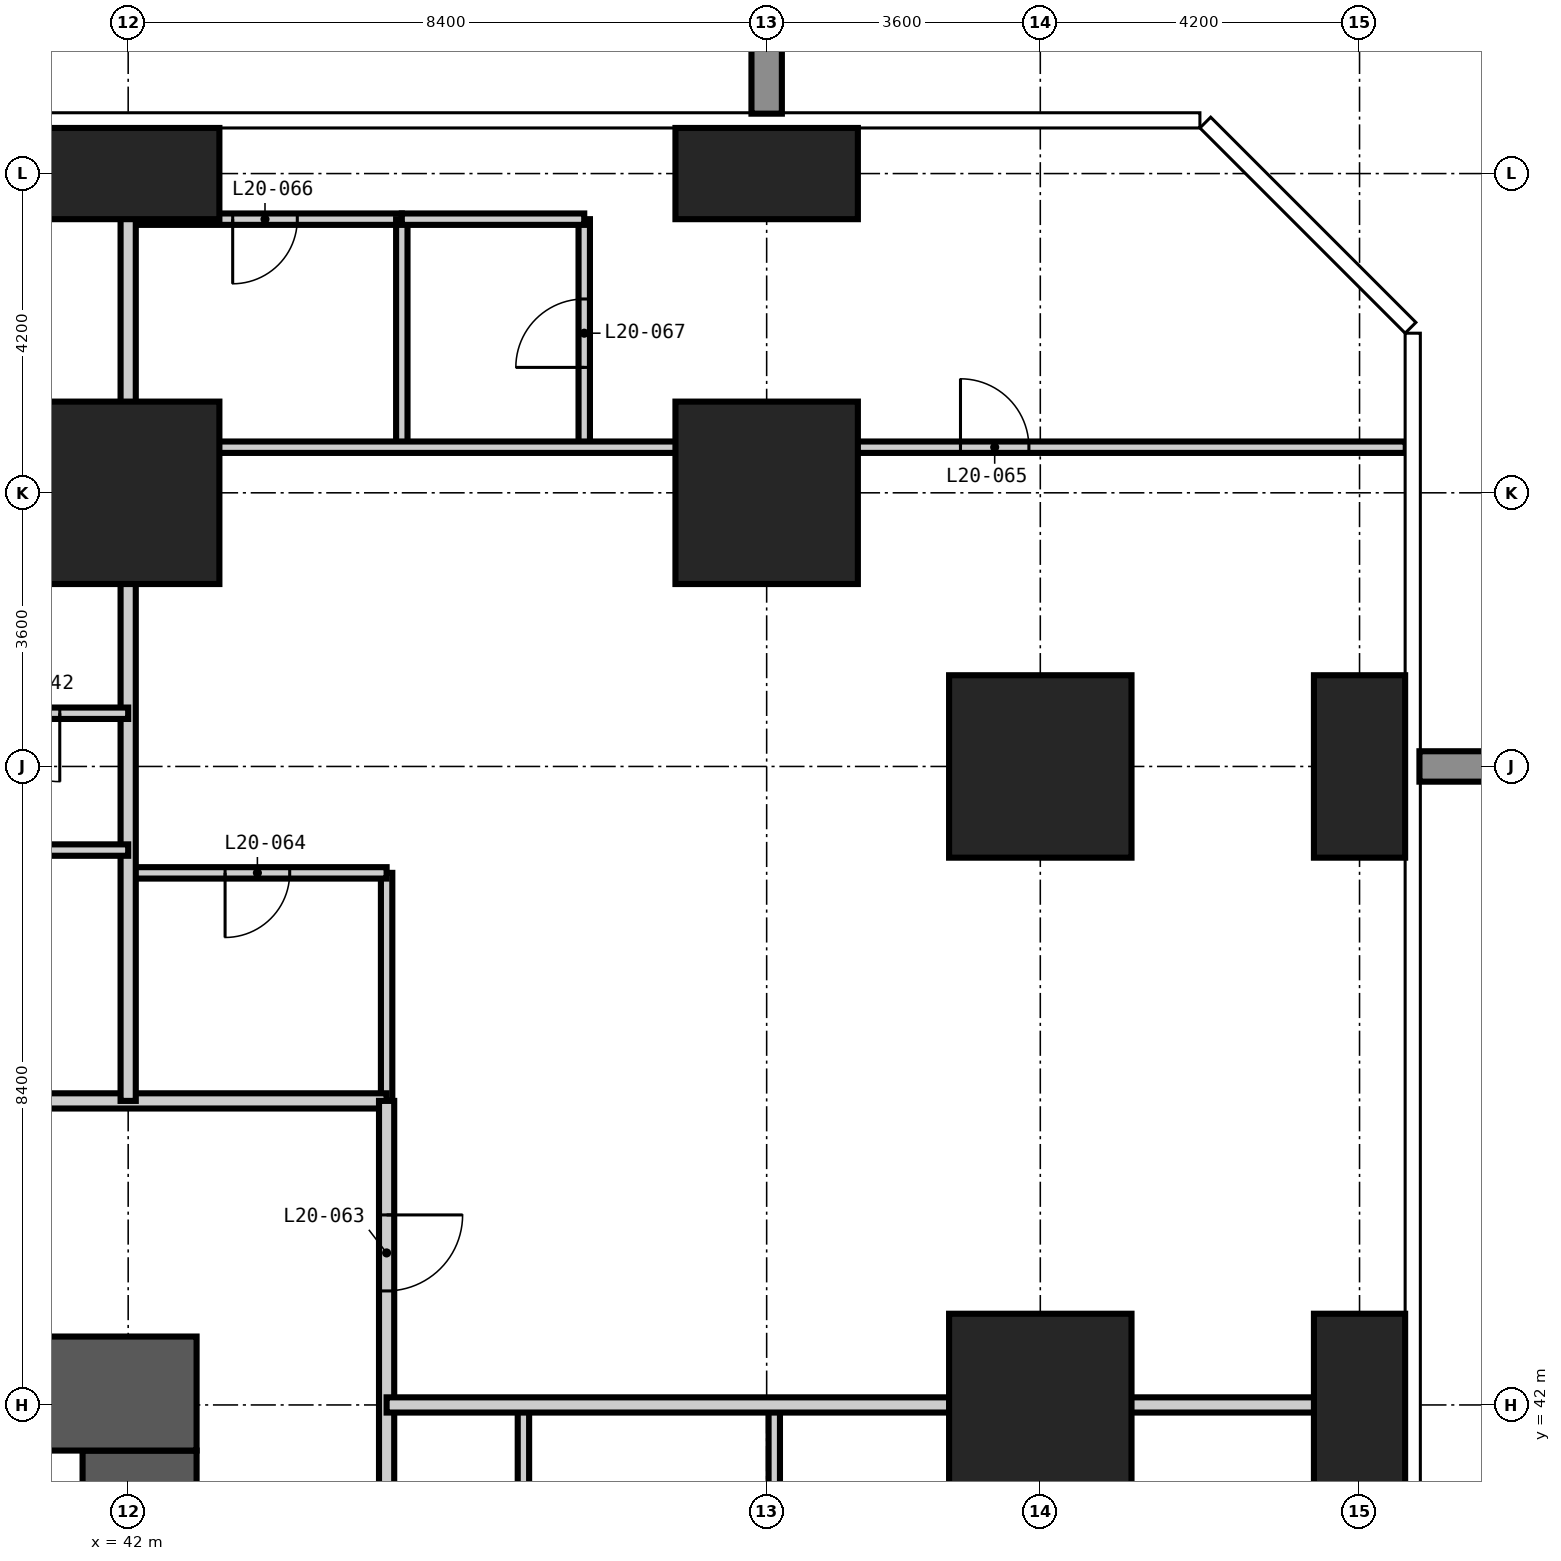
"""IFC4 building model, lengths in metres.
Left out: names, types, materials, properties, quantities, classifications, styles, units other than length and angle.
Written with IfcOpenShell. Run it as: python <this file> out.ifc"""

import sys

from ifc_helpers import new_model, si_unit, direction, frame, frame_2d, origin, origin_2d, place, context, subcontext, project, spatial, rectangle, extrude, element, fill, save


model = new_model("IFC4")
c1 = context("Model", 3, precision=1e-05, world=origin(), true_north=direction((0.0, 1.0)))
c2 = subcontext(c1, "Body", "Model", "MODEL_VIEW")
j1 = project(units=[si_unit("LENGTHUNIT", "METRE"), si_unit("PLANEANGLEUNIT", "RADIAN")], contexts=[c1])
p1 = place(None, origin())
s1 = spatial("IfcSite", under=j1, at=p1, CompositionType="ELEMENT")
p2 = place(p1, origin())
s2 = spatial("IfcBuilding", under=s1, at=p2, CompositionType="ELEMENT")
p3 = place(p2, frame((0.0, 0.0, 81.0)))
s3 = spatial("IfcBuildingStorey", under=s2, at=p3, CompositionType="ELEMENT", Elevation=81.0)
p4 = place(p3, frame((42.0, 54.0, -0.35), z_axis=(0.0, 0.0, 1.0), x_axis=(1.0, 0.0, 0.0)))
e1 = element("IfcColumn", 1, at=p4, inside=s3, PredefinedType="COLUMN", context=c2, shape_type="SweptSolid", body=[
    extrude(rectangle(XDim=2.4, YDim=2.4, at=origin_2d()), origin(), (0.0, 0.0, 1.0), 3.6),
])
p5 = place(p3, frame((42.0, 58.2, -0.35), z_axis=(0.0, 0.0, 1.0), x_axis=(1.0, 0.0, 0.0)))
e2 = element("IfcColumn", 2, at=p5, inside=s3, PredefinedType="COLUMN", context=c2, shape_type="SweptSolid", body=[
    extrude(rectangle(XDim=2.4, YDim=1.2, at=origin_2d()), origin(), (0.0, 0.0, 1.0), 3.6),
])
p6 = place(p3, frame((50.4, 54.0, -0.35), z_axis=(0.0, 0.0, 1.0), x_axis=(1.0, 0.0, 0.0)))
e3 = element("IfcColumn", 3, at=p6, inside=s3, PredefinedType="COLUMN", context=c2, shape_type="SweptSolid", body=[
    extrude(rectangle(XDim=2.4, YDim=2.4, at=origin_2d()), origin(), (0.0, 0.0, 1.0), 3.6),
])
p7 = place(p3, frame((50.4, 58.2, -0.35), z_axis=(0.0, 0.0, 1.0), x_axis=(1.0, 0.0, 0.0)))
e4 = element("IfcColumn", 4, at=p7, inside=s3, PredefinedType="COLUMN", context=c2, shape_type="SweptSolid", body=[
    extrude(rectangle(XDim=2.4, YDim=1.2, at=origin_2d()), origin(), (0.0, 0.0, 1.0), 3.6),
])
for number, where, z_axis, x_axis in (
    (5, (54.0, 42.0, -0.35), (0.0, 0.0, 1.0), (1.0, 0.0, 0.0)),
    (6, (54.0, 50.4, -0.35), (0.0, 0.0, 1.0), (1.0, 0.0, 0.0)),
):
    element("IfcColumn", number, at=place(p3, frame(where, z_axis=z_axis, x_axis=x_axis)), inside=s3, PredefinedType="COLUMN", context=c2, shape_type="SweptSolid", body=[
        extrude(rectangle(XDim=2.4, YDim=2.4, at=origin_2d()), origin(), (0.0, 0.0, 1.0), 3.6),
    ])
for number, where, z_axis, x_axis in (
    (7, (58.2, 42.0, -0.35), (0.0, 0.0, 1.0), (1.0, 0.0, 0.0)),
    (8, (58.2, 50.4, -0.35), (0.0, 0.0, 1.0), (1.0, 0.0, 0.0)),
):
    element("IfcColumn", number, at=place(p3, frame(where, z_axis=z_axis, x_axis=x_axis)), inside=s3, PredefinedType="COLUMN", context=c2, shape_type="SweptSolid", body=[
        extrude(rectangle(XDim=1.2, YDim=2.4, at=origin_2d()), origin(), (0.0, 0.0, 1.0), 3.6),
    ])
p8 = place(p3, frame((42.15, 17.4, -0.35), z_axis=(0.0, 0.0, 1.0), x_axis=(0.0, 1.0, 0.0)))
e9 = element("IfcWall", 9, at=p8, inside=s3, PredefinedType="SHEAR", context=c2, shape_type="SweptSolid", body=[
    extrude(rectangle(XDim=24.0, YDim=1.5, at=frame_2d((12.0, 0.0))), origin(), (0.0, 0.0, 1.0), 3.6),
])
p9 = place(p8, frame((0.2, 0.0, 0.35)))
e10 = element("IfcOpeningElement", 10, at=p9, cuts=e9, PredefinedType="OPENING", context=c2, shape_type="SweptSolid", body=[
    extrude(rectangle(XDim=1.2, YDim=2.2, at=frame_2d((0.6, 1.1))), frame((0.0, 0.76, 0.0), z_axis=(0.0, -1.0, 0.0), x_axis=(1.0, 0.0, 0.0)), (0.0, 0.0, 1.0), 1.52),
])
p10 = place(p8, frame((11.5, 0.0, 0.35)))
e11 = element("IfcOpeningElement", 11, at=p10, cuts=e9, PredefinedType="OPENING", context=c2, shape_type="SweptSolid", body=[
    extrude(rectangle(XDim=1.0, YDim=2.1, at=frame_2d((0.5, 1.05))), frame((0.0, 0.76, 0.0), z_axis=(0.0, -1.0, 0.0), x_axis=(1.0, 0.0, 0.0)), (0.0, 0.0, 1.0), 1.52),
])
p11 = place(p8, frame((19.9, 0.0, 0.35)))
e12 = element("IfcOpeningElement", 12, at=p11, cuts=e9, PredefinedType="OPENING", context=c2, shape_type="SweptSolid", body=[
    extrude(rectangle(XDim=1.0, YDim=2.1, at=frame_2d((0.5, 1.05))), frame((0.0, 0.76, 0.0), z_axis=(0.0, -1.0, 0.0), x_axis=(1.0, 0.0, 0.0)), (0.0, 0.0, 1.0), 1.52),
])
p12 = place(p3, frame((42.9, 42.15, -0.35), z_axis=(0.0, 0.0, 1.0), x_axis=(-1.0, 0.0, 0.0)))
e13 = element("IfcWall", 13, at=p12, inside=s3, PredefinedType="SHEAR", context=c2, shape_type="SweptSolid", body=[
    extrude(rectangle(XDim=27.0, YDim=1.5, at=frame_2d((13.5, 0.0))), origin(), (0.0, 0.0, 1.0), 3.6),
])
p13 = place(p12, frame((21.4, 0.0, 0.35)))
e14 = element("IfcOpeningElement", 14, at=p13, cuts=e13, PredefinedType="OPENING", context=c2, shape_type="SweptSolid", body=[
    extrude(rectangle(XDim=1.0, YDim=2.1, at=frame_2d((0.5, 1.05))), frame((0.0, 0.76, 0.0), z_axis=(0.0, -1.0, 0.0), x_axis=(1.0, 0.0, 0.0)), (0.0, 0.0, 1.0), 1.52),
])
p14 = place(p12, frame((10.8, 0.0, 0.35)))
e15 = element("IfcOpeningElement", 15, at=p14, cuts=e13, PredefinedType="OPENING", context=c2, shape_type="SweptSolid", body=[
    extrude(rectangle(XDim=1.2, YDim=2.2, at=frame_2d((0.6, 1.1))), frame((0.0, 0.76, 0.0), z_axis=(0.0, -1.0, 0.0), x_axis=(1.0, 0.0, 0.0)), (0.0, 0.0, 1.0), 1.52),
])
for number, where, z_axis, x_axis in (
    (16, (45.4, 46.0, 0.0), (0.0, 0.0, 1.0), (0.0, 1.0, 0.0)),
    (17, (47.2, 39.0, 0.0), (0.0, 0.0, 1.0), (0.0, 1.0, 0.0)),
    (18, (50.5, 39.0, 0.0), (0.0, 0.0, 1.0), (0.0, 1.0, 0.0)),
):
    element("IfcWall", number, at=place(p3, frame(where, z_axis=z_axis, x_axis=x_axis)), inside=s3, PredefinedType="PARTITIONING", context=c2, shape_type="SweptSolid", body=[
        extrude(rectangle(XDim=3.0, YDim=0.15, at=frame_2d((1.5, 0.0))), origin(), (0.0, 0.0, 1.0), 3.25),
    ])
p15 = place(p3, frame((42.0, 49.0, 0.0), z_axis=(0.0, 0.0, 1.0), x_axis=(1.0, 0.0, 0.0)))
e19 = element("IfcWall", 19, at=p15, inside=s3, PredefinedType="PARTITIONING", context=c2, shape_type="SweptSolid", body=[
    extrude(rectangle(XDim=3.4, YDim=0.15, at=frame_2d((1.7, 0.0))), origin(), (0.0, 0.0, 1.0), 3.25),
])
p16 = place(p15, frame((1.275, 0.0, 0.0)))
e20 = element("IfcOpeningElement", 20, at=p16, cuts=e19, PredefinedType="OPENING", context=c2, shape_type="SweptSolid", body=[
    extrude(rectangle(XDim=0.85, YDim=2.1, at=frame_2d((0.425, 1.05))), frame((0.0, 0.085, 0.0), z_axis=(0.0, -1.0, 0.0), x_axis=(1.0, 0.0, 0.0)), (0.0, 0.0, 1.0), 0.17),
])
p17 = place(p3, frame((42.0, 57.6, 0.0), z_axis=(0.0, 0.0, 1.0), x_axis=(1.0, 0.0, 0.0)))
e21 = element("IfcWall", 21, at=p17, inside=s3, PredefinedType="PARTITIONING", context=c2, shape_type="SweptSolid", body=[
    extrude(rectangle(XDim=3.6, YDim=0.15, at=frame_2d((1.8, 0.0))), origin(), (0.0, 0.0, 1.0), 3.25),
])
p18 = place(p17, frame((1.375, 0.0, 0.0)))
e22 = element("IfcOpeningElement", 22, at=p18, cuts=e21, PredefinedType="OPENING", context=c2, shape_type="SweptSolid", body=[
    extrude(rectangle(XDim=0.85, YDim=2.1, at=frame_2d((0.425, 1.05))), frame((0.0, 0.085, 0.0), z_axis=(0.0, -1.0, 0.0), x_axis=(1.0, 0.0, 0.0)), (0.0, 0.0, 1.0), 0.17),
])
p19 = place(p3, frame((14.0, 46.0, 0.0), z_axis=(0.0, 0.0, 1.0), x_axis=(1.0, 0.0, 0.0)))
e23 = element("IfcWall", 23, at=p19, inside=s3, PredefinedType="PARTITIONING", context=c2, shape_type="SweptSolid", body=[
    extrude(rectangle(XDim=31.4, YDim=0.2, at=frame_2d((15.7, 0.0))), origin(), (0.0, 0.0, 1.0), 3.25),
])
p20 = place(p19, frame((5.75, 0.0, 0.0)))
e24 = element("IfcOpeningElement", 24, at=p20, cuts=e23, PredefinedType="OPENING", context=c2, shape_type="SweptSolid", body=[
    extrude(rectangle(XDim=1.0, YDim=2.2, at=frame_2d((0.5, 1.1))), frame((0.0, 0.11, 0.0), z_axis=(0.0, -1.0, 0.0), x_axis=(1.0, 0.0, 0.0)), (0.0, 0.0, 1.0), 0.22),
])
p21 = place(p19, frame((10.7, 0.0, 0.0)))
e25 = element("IfcOpeningElement", 25, at=p21, cuts=e23, PredefinedType="OPENING", context=c2, shape_type="SweptSolid", body=[
    extrude(rectangle(XDim=1.0, YDim=2.2, at=frame_2d((0.5, 1.1))), frame((0.0, 0.11, 0.0), z_axis=(0.0, -1.0, 0.0), x_axis=(1.0, 0.0, 0.0)), (0.0, 0.0, 1.0), 0.22),
])
p22 = place(p19, frame((19.1, 0.0, 0.0)))
e26 = element("IfcOpeningElement", 26, at=p22, cuts=e23, PredefinedType="OPENING", context=c2, shape_type="SweptSolid", body=[
    extrude(rectangle(XDim=1.0, YDim=2.2, at=frame_2d((0.5, 1.1))), frame((0.0, 0.11, 0.0), z_axis=(0.0, -1.0, 0.0), x_axis=(1.0, 0.0, 0.0)), (0.0, 0.0, 1.0), 0.22),
])
p23 = place(p19, frame((24.05, 0.0, 0.0)))
e27 = element("IfcOpeningElement", 27, at=p23, cuts=e23, PredefinedType="OPENING", context=c2, shape_type="SweptSolid", body=[
    extrude(rectangle(XDim=1.0, YDim=2.2, at=frame_2d((0.5, 1.1))), frame((0.0, 0.11, 0.0), z_axis=(0.0, -1.0, 0.0), x_axis=(1.0, 0.0, 0.0)), (0.0, 0.0, 1.0), 0.22),
])
p24 = place(p3, frame((45.4, 46.0, 0.0), z_axis=(0.0, 0.0, 1.0), x_axis=(0.0, -1.0, 0.0)))
e28 = element("IfcWall", 28, at=p24, inside=s3, PredefinedType="PARTITIONING", context=c2, shape_type="SweptSolid", body=[
    extrude(rectangle(XDim=32.0, YDim=0.2, at=frame_2d((16.0, 0.0))), origin(), (0.0, 0.0, 1.0), 3.25),
])
p25 = place(p24, frame((22.4, 0.0, 0.0)))
e29 = element("IfcOpeningElement", 29, at=p25, cuts=e28, PredefinedType="OPENING", context=c2, shape_type="SweptSolid", body=[
    extrude(rectangle(XDim=1.0, YDim=2.2, at=frame_2d((0.5, 1.1))), frame((0.0, 0.11, 0.0), z_axis=(0.0, -1.0, 0.0), x_axis=(1.0, 0.0, 0.0)), (0.0, 0.0, 1.0), 0.22),
])
p26 = place(p24, frame((9.8, 0.0, 0.0)))
e30 = element("IfcOpeningElement", 30, at=p26, cuts=e28, PredefinedType="OPENING", context=c2, shape_type="SweptSolid", body=[
    extrude(rectangle(XDim=1.0, YDim=2.2, at=frame_2d((0.5, 1.1))), frame((0.0, 0.11, 0.0), z_axis=(0.0, -1.0, 0.0), x_axis=(1.0, 0.0, 0.0)), (0.0, 0.0, 1.0), 0.22),
])
p27 = place(p24, frame((30.1, 0.0, 0.0)))
e31 = element("IfcOpeningElement", 31, at=p27, cuts=e28, PredefinedType="OPENING", context=c2, shape_type="SweptSolid", body=[
    extrude(rectangle(XDim=1.0, YDim=2.2, at=frame_2d((0.5, 1.1))), frame((0.0, 0.11, 0.0), z_axis=(0.0, -1.0, 0.0), x_axis=(1.0, 0.0, 0.0)), (0.0, 0.0, 1.0), 0.22),
])
p28 = place(p24, frame((1.5, 0.0, 0.0)))
e32 = element("IfcOpeningElement", 32, at=p28, cuts=e28, PredefinedType="OPENING", context=c2, shape_type="SweptSolid", body=[
    extrude(rectangle(XDim=1.0, YDim=2.2, at=frame_2d((0.5, 1.1))), frame((0.0, 0.11, 0.0), z_axis=(0.0, -1.0, 0.0), x_axis=(1.0, 0.0, 0.0)), (0.0, 0.0, 1.0), 0.22),
])
p29 = place(p3, frame((42.0, 46.0, 0.0), z_axis=(0.0, 0.0, 1.0), x_axis=(0.0, 1.0, 0.0)))
e33 = element("IfcWall", 33, at=p29, inside=s3, PredefinedType="PARTITIONING", context=c2, shape_type="SweptSolid", body=[
    extrude(rectangle(XDim=12.808, YDim=0.2, at=frame_2d((6.404, 0.0))), origin(), (0.0, 0.0, 1.0), 3.25),
])
p30 = place(p3, frame((45.4, 42.0, 0.0), z_axis=(0.0, 0.0, 1.0), x_axis=(1.0, 0.0, 0.0)))
e34 = element("IfcWall", 34, at=p30, inside=s3, PredefinedType="PARTITIONING", context=c2, shape_type="SweptSolid", body=[
    extrude(rectangle(XDim=13.408, YDim=0.2, at=frame_2d((6.704, 0.0))), origin(), (0.0, 0.0, 1.0), 3.25),
])
p31 = place(p3, frame((45.6, 54.6, 0.0), z_axis=(0.0, 0.0, 1.0), x_axis=(0.0, 1.0, 0.0)))
e35 = element("IfcWall", 35, at=p31, inside=s3, PredefinedType="PARTITIONING", context=c2, shape_type="SweptSolid", body=[
    extrude(rectangle(XDim=3.0, YDim=0.15, at=frame_2d((1.5, 0.0))), origin(), (0.0, 0.0, 1.0), 3.25),
])
p32 = place(p3, frame((48.0, 54.6, 0.0), z_axis=(0.0, 0.0, 1.0), x_axis=(0.0, 1.0, 0.0)))
e36 = element("IfcWall", 36, at=p32, inside=s3, PredefinedType="PARTITIONING", context=c2, shape_type="SweptSolid", body=[
    extrude(rectangle(XDim=3.0, YDim=0.15, at=frame_2d((1.5, 0.0))), origin(), (0.0, 0.0, 1.0), 3.25),
])
p33 = place(p32, frame((1.05, 0.0, 0.0)))
e37 = element("IfcOpeningElement", 37, at=p33, cuts=e36, PredefinedType="OPENING", context=c2, shape_type="SweptSolid", body=[
    extrude(rectangle(XDim=0.9, YDim=2.1, at=frame_2d((0.45, 1.05))), frame((0.0, 0.085, 0.0), z_axis=(0.0, -1.0, 0.0), x_axis=(1.0, 0.0, 0.0)), (0.0, 0.0, 1.0), 0.17),
])
p34 = place(p3, frame((39.3, 49.3, 0.0), z_axis=(0.0, 0.0, 1.0), x_axis=(1.0, 0.0, 0.0)))
e38 = element("IfcWall", 38, at=p34, inside=s3, PredefinedType="PARTITIONING", context=c2, shape_type="SweptSolid", body=[
    extrude(rectangle(XDim=2.7, YDim=0.15, at=frame_2d((1.35, 0.0))), origin(), (0.0, 0.0, 1.0), 3.25),
])
p35 = place(p3, frame((39.3, 51.1, 0.0), z_axis=(0.0, 0.0, 1.0), x_axis=(1.0, 0.0, 0.0)))
e39 = element("IfcWall", 39, at=p35, inside=s3, PredefinedType="PARTITIONING", context=c2, shape_type="SweptSolid", body=[
    extrude(rectangle(XDim=2.7, YDim=0.15, at=frame_2d((1.35, 0.0))), origin(), (0.0, 0.0, 1.0), 3.25),
])
p36 = place(p35, frame((0.9, 0.0, 0.0)))
e40 = element("IfcOpeningElement", 40, at=p36, cuts=e39, PredefinedType="OPENING", context=c2, shape_type="SweptSolid", body=[
    extrude(rectangle(XDim=0.9, YDim=2.1, at=frame_2d((0.45, 1.05))), frame((0.0, 0.085, 0.0), z_axis=(0.0, -1.0, 0.0), x_axis=(1.0, 0.0, 0.0)), (0.0, 0.0, 1.0), 0.17),
])
p37 = place(p3, frame((42.0, 54.6, 0.0), z_axis=(0.0, 0.0, 1.0), x_axis=(1.0, 0.0, 0.0)))
e41 = element("IfcWall", 41, at=p37, inside=s3, PredefinedType="PARTITIONING", context=c2, shape_type="SweptSolid", body=[
    extrude(rectangle(XDim=16.808, YDim=0.15, at=frame_2d((8.404, 0.0))), origin(), (0.0, 0.0, 1.0), 3.25),
])
p38 = place(p37, frame((10.95, 0.0, 0.0)))
e42 = element("IfcOpeningElement", 42, at=p38, cuts=e41, PredefinedType="OPENING", context=c2, shape_type="SweptSolid", body=[
    extrude(rectangle(XDim=0.9, YDim=2.1, at=frame_2d((0.45, 1.05))), frame((0.0, 0.085, 0.0), z_axis=(0.0, -1.0, 0.0), x_axis=(1.0, 0.0, 0.0)), (0.0, 0.0, 1.0), 0.17),
])
p39 = place(p3, frame((45.6, 57.6, 0.0), z_axis=(0.0, 0.0, 1.0), x_axis=(1.0, 0.0, 0.0)))
e43 = element("IfcWall", 43, at=p39, inside=s3, PredefinedType="PARTITIONING", context=c2, shape_type="SweptSolid", body=[
    extrude(rectangle(XDim=2.4, YDim=0.15, at=frame_2d((1.2, 0.0))), origin(), (0.0, 0.0, 1.0), 3.25),
])
p40 = place(p36, frame((0.9, 0.0, 0.0), z_axis=(0.0, 0.0, 1.0), x_axis=(-1.0, 0.0, 0.0)))
e44 = element("IfcDoor", 44, at=p40, inside=s3, OperationType="SINGLE_SWING_LEFT", PredefinedType="DOOR", context=c2, shape_type="SweptSolid", body=[
    extrude(rectangle(XDim=0.9, YDim=2.1, at=frame_2d((0.45, 1.05))), frame((0.0, 0.025, 0.0), z_axis=(0.0, -1.0, 0.0), x_axis=(1.0, 0.0, 0.0)), (0.0, 0.0, 1.0), 0.05),
])
fill(e40, e44)
p41 = place(p28, origin())
e45 = element("IfcDoor", 45, at=p41, inside=s3, OperationType="SINGLE_SWING_LEFT", PredefinedType="DOOR", context=c2, shape_type="SweptSolid", body=[
    extrude(rectangle(XDim=1.0, YDim=2.2, at=frame_2d((0.5, 1.1))), frame((0.0, 0.025, 0.0), z_axis=(0.0, -1.0, 0.0), x_axis=(1.0, 0.0, 0.0)), (0.0, 0.0, 1.0), 0.05),
])
fill(e32, e45)
p42 = place(p16, frame((0.85, 0.0, 0.0), z_axis=(0.0, 0.0, 1.0), x_axis=(-1.0, 0.0, 0.0)))
e46 = element("IfcDoor", 46, at=p42, inside=s3, OperationType="SINGLE_SWING_RIGHT", PredefinedType="DOOR", context=c2, shape_type="SweptSolid", body=[
    extrude(rectangle(XDim=0.85, YDim=2.1, at=frame_2d((0.425, 1.05))), frame((0.0, 0.025, 0.0), z_axis=(0.0, -1.0, 0.0), x_axis=(1.0, 0.0, 0.0)), (0.0, 0.0, 1.0), 0.05),
])
fill(e20, e46)
p43 = place(p38, origin())
e47 = element("IfcDoor", 47, at=p43, inside=s3, OperationType="SINGLE_SWING_LEFT", PredefinedType="DOOR", context=c2, shape_type="SweptSolid", body=[
    extrude(rectangle(XDim=0.9, YDim=2.1, at=frame_2d((0.45, 1.05))), frame((0.0, 0.025, 0.0), z_axis=(0.0, -1.0, 0.0), x_axis=(1.0, 0.0, 0.0)), (0.0, 0.0, 1.0), 0.05),
])
fill(e42, e47)
p44 = place(p18, frame((0.85, 0.0, 0.0), z_axis=(0.0, 0.0, 1.0), x_axis=(-1.0, 0.0, 0.0)))
e48 = element("IfcDoor", 48, at=p44, inside=s3, OperationType="SINGLE_SWING_RIGHT", PredefinedType="DOOR", context=c2, shape_type="SweptSolid", body=[
    extrude(rectangle(XDim=0.85, YDim=2.1, at=frame_2d((0.425, 1.05))), frame((0.0, 0.025, 0.0), z_axis=(0.0, -1.0, 0.0), x_axis=(1.0, 0.0, 0.0)), (0.0, 0.0, 1.0), 0.05),
])
fill(e22, e48)
p45 = place(p33, origin())
e49 = element("IfcDoor", 49, at=p45, inside=s3, OperationType="SINGLE_SWING_LEFT", PredefinedType="DOOR", context=c2, shape_type="SweptSolid", body=[
    extrude(rectangle(XDim=0.9, YDim=2.1, at=frame_2d((0.45, 1.05))), frame((0.0, 0.025, 0.0), z_axis=(0.0, -1.0, 0.0), x_axis=(1.0, 0.0, 0.0)), (0.0, 0.0, 1.0), 0.05),
])
fill(e37, e49)
save(model, sys.argv[1])
